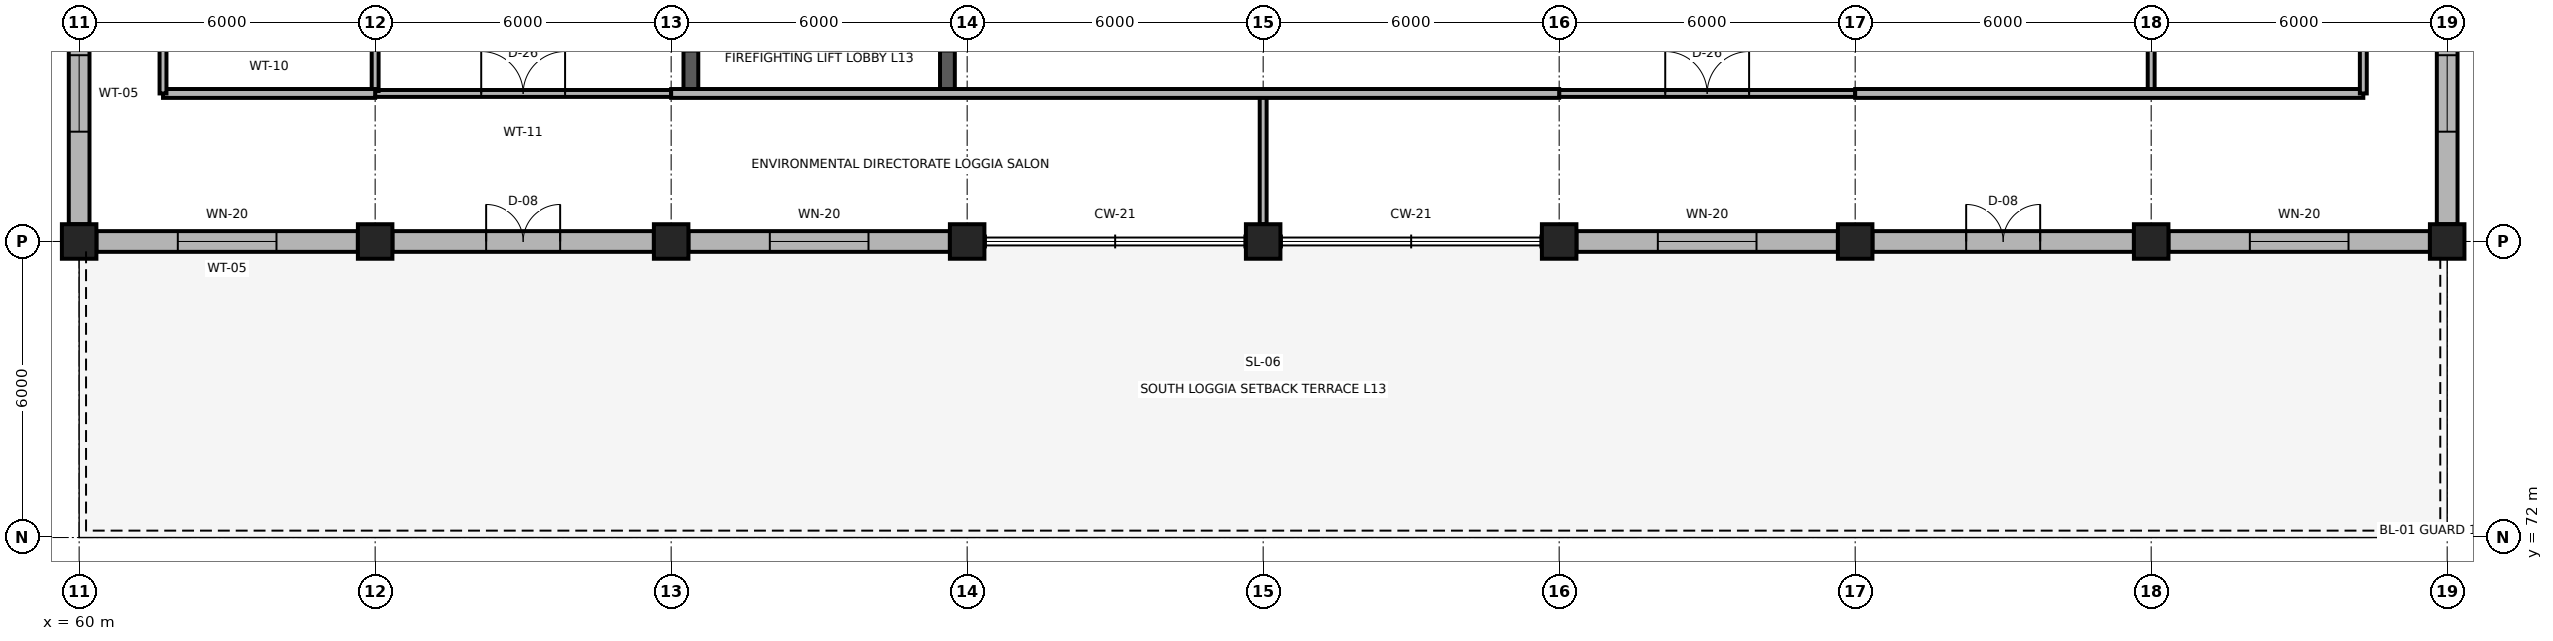
"""IFC4 building model, lengths in metres.
Left out: names, types, materials, properties, quantities, classifications, styles, units other than length and angle.
Written with IfcOpenShell. Run it as: python <this file> out.ifc"""

import sys

from ifc_helpers import new_model, si_unit, direction, frame, frame_2d, origin, origin_2d, place, context, subcontext, project, spatial, rectangle, extrude, element, fill, save


model = new_model("IFC4")
c1 = context("Model", 3, precision=1e-05, world=origin(), true_north=direction((0.0, 1.0)))
c2 = subcontext(c1, "Body", "Model", "MODEL_VIEW")
j1 = project(units=[si_unit("LENGTHUNIT", "METRE"), si_unit("PLANEANGLEUNIT", "RADIAN")], contexts=[c1])
p1 = place(None, origin())
s1 = spatial("IfcSite", under=j1, at=p1, CompositionType="ELEMENT")
p2 = place(p1, origin())
s2 = spatial("IfcBuilding", under=s1, at=p2, CompositionType="ELEMENT")
p3 = place(p2, frame((0.0, 0.0, 52.2)))
s3 = spatial("IfcBuildingStorey", under=s2, at=p3, CompositionType="ELEMENT", Elevation=52.2)
for number, where, z_axis, x_axis in (
    (1, (60.0, 78.0, 0.0), (0.0, 0.0, 1.0), (1.0, 0.0, 0.0)),
    (2, (66.0, 78.0, 0.0), (0.0, 0.0, 1.0), (1.0, 0.0, 0.0)),
    (3, (72.0, 78.0, 0.0), (0.0, 0.0, 1.0), (1.0, 0.0, 0.0)),
    (4, (78.0, 78.0, 0.0), (0.0, 0.0, 1.0), (1.0, 0.0, 0.0)),
    (5, (84.0, 78.0, 0.0), (0.0, 0.0, 1.0), (1.0, 0.0, 0.0)),
    (6, (90.0, 78.0, 0.0), (0.0, 0.0, 1.0), (1.0, 0.0, 0.0)),
    (7, (96.0, 78.0, 0.0), (0.0, 0.0, 1.0), (1.0, 0.0, 0.0)),
    (8, (102.0, 78.0, 0.0), (0.0, 0.0, 1.0), (1.0, 0.0, 0.0)),
    (9, (108.0, 78.0, 0.0), (0.0, 0.0, 1.0), (1.0, 0.0, 0.0)),
):
    element("IfcColumn", number, at=place(p3, frame(where, z_axis=z_axis, x_axis=x_axis)), inside=s3, PredefinedType="COLUMN", context=c2, shape_type="SweptSolid", body=[
        extrude(rectangle(XDim=0.7, YDim=0.7, at=origin_2d()), origin(), (0.0, 0.0, 1.0), 3.9),
    ])
p4 = place(p3, frame((60.35, 78.0, 0.0), z_axis=(0.0, 0.0, 1.0), x_axis=(1.0, 0.0, 0.0)))
e10 = element("IfcWall", 10, at=p4, inside=s3, PredefinedType="SOLIDWALL", context=c2, shape_type="SweptSolid", body=[
    extrude(rectangle(XDim=5.3, YDim=0.42, at=frame_2d((2.65, 0.0))), origin(), (0.0, 0.0, 1.0), 3.32),
])
p5 = place(p4, frame((1.65, 0.0, 0.85)))
e11 = element("IfcOpeningElement", 11, at=p5, cuts=e10, PredefinedType="OPENING", context=c2, shape_type="SweptSolid", body=[
    extrude(rectangle(XDim=2.0, YDim=1.95, at=frame_2d((1.0, 0.975))), frame((0.0, 0.225, 0.0), z_axis=(0.0, -1.0, 0.0), x_axis=(1.0, 0.0, 0.0)), (0.0, 0.0, 1.0), 0.45),
])
p6 = place(p3, frame((66.35, 78.0, 0.0), z_axis=(0.0, 0.0, 1.0), x_axis=(1.0, 0.0, 0.0)))
e12 = element("IfcWall", 12, at=p6, inside=s3, PredefinedType="SOLIDWALL", context=c2, shape_type="SweptSolid", body=[
    extrude(rectangle(XDim=5.3, YDim=0.42, at=frame_2d((2.65, 0.0))), origin(), (0.0, 0.0, 1.0), 3.32),
])
p7 = place(p6, frame((1.9, 0.0, 0.0)))
e13 = element("IfcOpeningElement", 13, at=p7, cuts=e12, PredefinedType="OPENING", context=c2, shape_type="SweptSolid", body=[
    extrude(rectangle(XDim=1.5, YDim=2.3, at=frame_2d((0.75, 1.15))), frame((0.0, 0.225, 0.0), z_axis=(0.0, -1.0, 0.0), x_axis=(1.0, 0.0, 0.0)), (0.0, 0.0, 1.0), 0.45),
])
p8 = place(p3, frame((72.35, 78.0, 0.0), z_axis=(0.0, 0.0, 1.0), x_axis=(1.0, 0.0, 0.0)))
e14 = element("IfcWall", 14, at=p8, inside=s3, PredefinedType="SOLIDWALL", context=c2, shape_type="SweptSolid", body=[
    extrude(rectangle(XDim=5.3, YDim=0.42, at=frame_2d((2.65, 0.0))), origin(), (0.0, 0.0, 1.0), 3.32),
])
p9 = place(p8, frame((1.65, 0.0, 0.85)))
e15 = element("IfcOpeningElement", 15, at=p9, cuts=e14, PredefinedType="OPENING", context=c2, shape_type="SweptSolid", body=[
    extrude(rectangle(XDim=2.0, YDim=1.95, at=frame_2d((1.0, 0.975))), frame((0.0, 0.225, 0.0), z_axis=(0.0, -1.0, 0.0), x_axis=(1.0, 0.0, 0.0)), (0.0, 0.0, 1.0), 0.45),
])
p10 = place(p3, frame((90.35, 78.0, 0.0), z_axis=(0.0, 0.0, 1.0), x_axis=(1.0, 0.0, 0.0)))
e16 = element("IfcWall", 16, at=p10, inside=s3, PredefinedType="SOLIDWALL", context=c2, shape_type="SweptSolid", body=[
    extrude(rectangle(XDim=5.3, YDim=0.42, at=frame_2d((2.65, 0.0))), origin(), (0.0, 0.0, 1.0), 3.32),
])
p11 = place(p10, frame((1.65, 0.0, 0.85)))
e17 = element("IfcOpeningElement", 17, at=p11, cuts=e16, PredefinedType="OPENING", context=c2, shape_type="SweptSolid", body=[
    extrude(rectangle(XDim=2.0, YDim=1.95, at=frame_2d((1.0, 0.975))), frame((0.0, 0.225, 0.0), z_axis=(0.0, -1.0, 0.0), x_axis=(1.0, 0.0, 0.0)), (0.0, 0.0, 1.0), 0.45),
])
p12 = place(p3, frame((96.35, 78.0, 0.0), z_axis=(0.0, 0.0, 1.0), x_axis=(1.0, 0.0, 0.0)))
e18 = element("IfcWall", 18, at=p12, inside=s3, PredefinedType="SOLIDWALL", context=c2, shape_type="SweptSolid", body=[
    extrude(rectangle(XDim=5.3, YDim=0.42, at=frame_2d((2.65, 0.0))), origin(), (0.0, 0.0, 1.0), 3.32),
])
p13 = place(p12, frame((1.9, 0.0, 0.0)))
e19 = element("IfcOpeningElement", 19, at=p13, cuts=e18, PredefinedType="OPENING", context=c2, shape_type="SweptSolid", body=[
    extrude(rectangle(XDim=1.5, YDim=2.3, at=frame_2d((0.75, 1.15))), frame((0.0, 0.225, 0.0), z_axis=(0.0, -1.0, 0.0), x_axis=(1.0, 0.0, 0.0)), (0.0, 0.0, 1.0), 0.45),
])
p14 = place(p3, frame((102.35, 78.0, 0.0), z_axis=(0.0, 0.0, 1.0), x_axis=(1.0, 0.0, 0.0)))
e20 = element("IfcWall", 20, at=p14, inside=s3, PredefinedType="SOLIDWALL", context=c2, shape_type="SweptSolid", body=[
    extrude(rectangle(XDim=5.3, YDim=0.42, at=frame_2d((2.65, 0.0))), origin(), (0.0, 0.0, 1.0), 3.32),
])
p15 = place(p14, frame((1.65, 0.0, 0.85)))
e21 = element("IfcOpeningElement", 21, at=p15, cuts=e20, PredefinedType="OPENING", context=c2, shape_type="SweptSolid", body=[
    extrude(rectangle(XDim=2.0, YDim=1.95, at=frame_2d((1.0, 0.975))), frame((0.0, 0.225, 0.0), z_axis=(0.0, -1.0, 0.0), x_axis=(1.0, 0.0, 0.0)), (0.0, 0.0, 1.0), 0.45),
])
p16 = place(p3, frame((60.0, 78.35, 0.0), z_axis=(0.0, 0.0, 1.0), x_axis=(0.0, 1.0, 0.0)))
e22 = element("IfcWall", 22, at=p16, inside=s3, PredefinedType="SOLIDWALL", context=c2, shape_type="SweptSolid", body=[
    extrude(rectangle(XDim=5.3, YDim=0.42, at=frame_2d((2.65, 0.0))), origin(), (0.0, 0.0, 1.0), 3.32),
])
p17 = place(p16, frame((1.875, 0.0, 0.85)))
e23 = element("IfcOpeningElement", 23, at=p17, cuts=e22, PredefinedType="OPENING", context=c2, shape_type="SweptSolid", body=[
    extrude(rectangle(XDim=1.55, YDim=1.9, at=frame_2d((0.775, 0.95))), frame((0.0, 0.225, 0.0), z_axis=(0.0, -1.0, 0.0), x_axis=(1.0, 0.0, 0.0)), (0.0, 0.0, 1.0), 0.45),
])
p18 = place(p3, frame((108.0, 78.35, 0.0), z_axis=(0.0, 0.0, 1.0), x_axis=(0.0, 1.0, 0.0)))
e24 = element("IfcWall", 24, at=p18, inside=s3, PredefinedType="SOLIDWALL", context=c2, shape_type="SweptSolid", body=[
    extrude(rectangle(XDim=5.3, YDim=0.42, at=frame_2d((2.65, 0.0))), origin(), (0.0, 0.0, 1.0), 3.32),
])
p19 = place(p18, frame((1.875, 0.0, 0.85)))
e25 = element("IfcOpeningElement", 25, at=p19, cuts=e24, PredefinedType="OPENING", context=c2, shape_type="SweptSolid", body=[
    extrude(rectangle(XDim=1.55, YDim=1.9, at=frame_2d((0.775, 0.95))), frame((0.0, 0.225, 0.0), z_axis=(0.0, -1.0, 0.0), x_axis=(1.0, 0.0, 0.0)), (0.0, 0.0, 1.0), 0.45),
])
p20 = place(p3, frame((72.4, 81.0, 0.0), z_axis=(0.0, 0.0, 1.0), x_axis=(0.0, 1.0, 0.0)))
e26 = element("IfcWall", 26, at=p20, inside=s3, PredefinedType="SHEAR", context=c2, shape_type="SweptSolid", body=[
    extrude(rectangle(XDim=3.0, YDim=0.3, at=frame_2d((1.5, 0.0))), origin(), (0.0, 0.0, 1.0), 3.74),
])
p21 = place(p20, frame((0.85, 0.0, 0.0)))
e27 = element("IfcOpeningElement", 27, at=p21, cuts=e26, PredefinedType="OPENING", context=c2, shape_type="SweptSolid", body=[
    extrude(rectangle(XDim=1.3, YDim=2.2, at=frame_2d((0.65, 1.1))), frame((0.0, 0.165, 0.0), z_axis=(0.0, -1.0, 0.0), x_axis=(1.0, 0.0, 0.0)), (0.0, 0.0, 1.0), 0.33),
])
p22 = place(p3, frame((77.6, 81.0, 0.0), z_axis=(0.0, 0.0, 1.0), x_axis=(0.0, 1.0, 0.0)))
e28 = element("IfcWall", 28, at=p22, inside=s3, PredefinedType="SHEAR", context=c2, shape_type="SweptSolid", body=[
    extrude(rectangle(XDim=3.0, YDim=0.3, at=frame_2d((1.5, 0.0))), origin(), (0.0, 0.0, 1.0), 3.74),
])
p23 = place(p22, frame((0.85, 0.0, 0.0)))
e29 = element("IfcOpeningElement", 29, at=p23, cuts=e28, PredefinedType="OPENING", context=c2, shape_type="SweptSolid", body=[
    extrude(rectangle(XDim=1.3, YDim=2.2, at=frame_2d((0.65, 1.1))), frame((0.0, 0.165, 0.0), z_axis=(0.0, -1.0, 0.0), x_axis=(1.0, 0.0, 0.0)), (0.0, 0.0, 1.0), 0.33),
])
p24 = place(p3, frame((66.0, 81.0, 0.0), z_axis=(0.0, 0.0, 1.0), x_axis=(1.0, 0.0, 0.0)))
e30 = element("IfcWall", 30, at=p24, inside=s3, PredefinedType="PARTITIONING", context=c2, shape_type="SweptSolid", body=[
    extrude(rectangle(XDim=6.0, YDim=0.14, at=frame_2d((3.0, 0.0))), origin(), (0.0, 0.0, 1.0), 3.74),
])
p25 = place(p24, frame((2.15, 0.0, 0.0)))
e31 = element("IfcOpeningElement", 31, at=p25, cuts=e30, PredefinedType="OPENING", context=c2, shape_type="SweptSolid", body=[
    extrude(rectangle(XDim=1.7, YDim=2.45, at=frame_2d((0.85, 1.225))), frame((0.0, 0.085, 0.0), z_axis=(0.0, -1.0, 0.0), x_axis=(1.0, 0.0, 0.0)), (0.0, 0.0, 1.0), 0.17),
])
p26 = place(p3, frame((90.0, 81.0, 0.0), z_axis=(0.0, 0.0, 1.0), x_axis=(1.0, 0.0, 0.0)))
e32 = element("IfcWall", 32, at=p26, inside=s3, PredefinedType="PARTITIONING", context=c2, shape_type="SweptSolid", body=[
    extrude(rectangle(XDim=6.0, YDim=0.14, at=frame_2d((3.0, 0.0))), origin(), (0.0, 0.0, 1.0), 3.74),
])
p27 = place(p26, frame((2.15, 0.0, 0.0)))
e33 = element("IfcOpeningElement", 33, at=p27, cuts=e32, PredefinedType="OPENING", context=c2, shape_type="SweptSolid", body=[
    extrude(rectangle(XDim=1.7, YDim=2.45, at=frame_2d((0.85, 1.225))), frame((0.0, 0.085, 0.0), z_axis=(0.0, -1.0, 0.0), x_axis=(1.0, 0.0, 0.0)), (0.0, 0.0, 1.0), 0.17),
])
p28 = place(p3, frame((66.0, 81.05, 0.0), z_axis=(0.0, 0.0, 1.0), x_axis=(0.0, 1.0, 0.0)))
e34 = element("IfcWall", 34, at=p28, inside=s3, PredefinedType="PARTITIONING", context=c2, shape_type="SweptSolid", body=[
    extrude(rectangle(XDim=2.9, YDim=0.14, at=frame_2d((1.45, 0.0))), origin(), (0.0, 0.0, 1.0), 3.449),
])
p29 = place(p28, frame((0.925, 0.0, 0.0)))
e35 = element("IfcOpeningElement", 35, at=p29, cuts=e34, PredefinedType="OPENING", context=c2, shape_type="SweptSolid", body=[
    extrude(rectangle(XDim=1.05, YDim=2.25, at=frame_2d((0.525, 1.125))), frame((0.0, 0.085, 0.0), z_axis=(0.0, -1.0, 0.0), x_axis=(1.0, 0.0, 0.0)), (0.0, 0.0, 1.0), 0.17),
])
p30 = place(p3, frame((102.0, 81.05, 0.0), z_axis=(0.0, 0.0, 1.0), x_axis=(0.0, 1.0, 0.0)))
e36 = element("IfcWall", 36, at=p30, inside=s3, PredefinedType="PARTITIONING", context=c2, shape_type="SweptSolid", body=[
    extrude(rectangle(XDim=2.9, YDim=0.14, at=frame_2d((1.45, 0.0))), origin(), (0.0, 0.0, 1.0), 3.449),
])
p31 = place(p30, frame((0.925, 0.0, 0.0)))
e37 = element("IfcOpeningElement", 37, at=p31, cuts=e36, PredefinedType="OPENING", context=c2, shape_type="SweptSolid", body=[
    extrude(rectangle(XDim=1.05, YDim=2.25, at=frame_2d((0.525, 1.125))), frame((0.0, 0.085, 0.0), z_axis=(0.0, -1.0, 0.0), x_axis=(1.0, 0.0, 0.0)), (0.0, 0.0, 1.0), 0.17),
])
p32 = place(p3, frame((84.0, 78.35, 0.0), z_axis=(0.0, 0.0, 1.0), x_axis=(0.0, 1.0, 0.0)))
e38 = element("IfcWall", 38, at=p32, inside=s3, PredefinedType="PARTITIONING", context=c2, shape_type="SweptSolid", body=[
    extrude(rectangle(XDim=2.65, YDim=0.14, at=frame_2d((1.325, 0.0))), origin(), (0.0, 0.0, 1.0), 3.449),
])
p33 = place(p3, frame((61.7, 81.0, 0.0), z_axis=(0.0, 0.0, 1.0), x_axis=(1.0, 0.0, 0.0)))
e39 = element("IfcWall", 39, at=p33, inside=s3, PredefinedType="PARTITIONING", context=c2, shape_type="SweptSolid", body=[
    extrude(rectangle(XDim=4.3, YDim=0.18, at=frame_2d((2.15, 0.0))), origin(), (0.0, 0.0, 1.0), 3.74),
])
p34 = place(p3, frame((72.0, 81.0, 0.0), z_axis=(0.0, 0.0, 1.0), x_axis=(1.0, 0.0, 0.0)))
e40 = element("IfcWall", 40, at=p34, inside=s3, PredefinedType="PARTITIONING", context=c2, shape_type="SweptSolid", body=[
    extrude(rectangle(XDim=18.0, YDim=0.18, at=frame_2d((9.0, 0.0))), origin(), (0.0, 0.0, 1.0), 3.74),
])
p35 = place(p3, frame((96.0, 81.0, 0.0), z_axis=(0.0, 0.0, 1.0), x_axis=(1.0, 0.0, 0.0)))
e41 = element("IfcWall", 41, at=p35, inside=s3, PredefinedType="PARTITIONING", context=c2, shape_type="SweptSolid", body=[
    extrude(rectangle(XDim=10.3, YDim=0.18, at=frame_2d((5.15, 0.0))), origin(), (0.0, 0.0, 1.0), 3.74),
])
for number, where, z_axis, x_axis in (
    (42, (61.7, 81.0, 0.0), (0.0, 0.0, 1.0), (0.0, 1.0, 0.0)),
    (43, (106.3, 81.0, 0.0), (0.0, 0.0, 1.0), (0.0, 1.0, 0.0)),
):
    element("IfcWall", number, at=place(p3, frame(where, z_axis=z_axis, x_axis=x_axis)), inside=s3, PredefinedType="PARTITIONING", context=c2, shape_type="SweptSolid", body=[
        extrude(rectangle(XDim=1.15, YDim=0.14, at=frame_2d((0.575, 0.0))), origin(), (0.0, 0.0, 1.0), 3.74),
    ])
p36 = place(p5, origin())
e44 = element("IfcWindow", 44, at=p36, inside=s3, PartitioningType="SINGLE_PANEL", PredefinedType="WINDOW", context=c2, shape_type="SweptSolid", body=[
    extrude(rectangle(XDim=2.0, YDim=1.95, at=frame_2d((1.0, 0.975))), frame((0.0, 0.03, 0.0), z_axis=(0.0, -1.0, 0.0), x_axis=(1.0, 0.0, 0.0)), (0.0, 0.0, 1.0), 0.06),
])
fill(e11, e44)
p37 = place(p7, origin())
e45 = element("IfcDoor", 45, at=p37, inside=s3, OperationType="DOUBLE_DOOR_SINGLE_SWING", PredefinedType="DOOR", context=c2, shape_type="SweptSolid", body=[
    extrude(rectangle(XDim=1.5, YDim=2.3, at=frame_2d((0.75, 1.15))), frame((0.0, 0.025, 0.0), z_axis=(0.0, -1.0, 0.0), x_axis=(1.0, 0.0, 0.0)), (0.0, 0.0, 1.0), 0.05),
])
fill(e13, e45)
p38 = place(p9, origin())
e46 = element("IfcWindow", 46, at=p38, inside=s3, PartitioningType="SINGLE_PANEL", PredefinedType="WINDOW", context=c2, shape_type="SweptSolid", body=[
    extrude(rectangle(XDim=2.0, YDim=1.95, at=frame_2d((1.0, 0.975))), frame((0.0, 0.03, 0.0), z_axis=(0.0, -1.0, 0.0), x_axis=(1.0, 0.0, 0.0)), (0.0, 0.0, 1.0), 0.06),
])
fill(e15, e46)
p39 = place(p11, origin())
e47 = element("IfcWindow", 47, at=p39, inside=s3, PartitioningType="SINGLE_PANEL", PredefinedType="WINDOW", context=c2, shape_type="SweptSolid", body=[
    extrude(rectangle(XDim=2.0, YDim=1.95, at=frame_2d((1.0, 0.975))), frame((0.0, 0.03, 0.0), z_axis=(0.0, -1.0, 0.0), x_axis=(1.0, 0.0, 0.0)), (0.0, 0.0, 1.0), 0.06),
])
fill(e17, e47)
p40 = place(p13, origin())
e48 = element("IfcDoor", 48, at=p40, inside=s3, OperationType="DOUBLE_DOOR_SINGLE_SWING", PredefinedType="DOOR", context=c2, shape_type="SweptSolid", body=[
    extrude(rectangle(XDim=1.5, YDim=2.3, at=frame_2d((0.75, 1.15))), frame((0.0, 0.025, 0.0), z_axis=(0.0, -1.0, 0.0), x_axis=(1.0, 0.0, 0.0)), (0.0, 0.0, 1.0), 0.05),
])
fill(e19, e48)
p41 = place(p15, origin())
e49 = element("IfcWindow", 49, at=p41, inside=s3, PartitioningType="SINGLE_PANEL", PredefinedType="WINDOW", context=c2, shape_type="SweptSolid", body=[
    extrude(rectangle(XDim=2.0, YDim=1.95, at=frame_2d((1.0, 0.975))), frame((0.0, 0.03, 0.0), z_axis=(0.0, -1.0, 0.0), x_axis=(1.0, 0.0, 0.0)), (0.0, 0.0, 1.0), 0.06),
])
fill(e21, e49)
p42 = place(p17, origin())
e50 = element("IfcWindow", 50, at=p42, inside=s3, PartitioningType="SINGLE_PANEL", PredefinedType="WINDOW", context=c2, shape_type="SweptSolid", body=[
    extrude(rectangle(XDim=1.55, YDim=1.9, at=frame_2d((0.775, 0.95))), frame((0.0, 0.03, 0.0), z_axis=(0.0, -1.0, 0.0), x_axis=(1.0, 0.0, 0.0)), (0.0, 0.0, 1.0), 0.06),
])
fill(e23, e50)
p43 = place(p19, origin())
e51 = element("IfcWindow", 51, at=p43, inside=s3, PartitioningType="SINGLE_PANEL", PredefinedType="WINDOW", context=c2, shape_type="SweptSolid", body=[
    extrude(rectangle(XDim=1.55, YDim=1.9, at=frame_2d((0.775, 0.95))), frame((0.0, 0.03, 0.0), z_axis=(0.0, -1.0, 0.0), x_axis=(1.0, 0.0, 0.0)), (0.0, 0.0, 1.0), 0.06),
])
fill(e25, e51)
p44 = place(p25, origin())
e52 = element("IfcDoor", 52, at=p44, inside=s3, OperationType="DOUBLE_DOOR_SINGLE_SWING", PredefinedType="DOOR", context=c2, shape_type="SweptSolid", body=[
    extrude(rectangle(XDim=1.7, YDim=2.45, at=frame_2d((0.85, 1.225))), frame((0.0, 0.025, 0.0), z_axis=(0.0, -1.0, 0.0), x_axis=(1.0, 0.0, 0.0)), (0.0, 0.0, 1.0), 0.05),
])
fill(e31, e52)
p45 = place(p27, origin())
e53 = element("IfcDoor", 53, at=p45, inside=s3, OperationType="DOUBLE_DOOR_SINGLE_SWING", PredefinedType="DOOR", context=c2, shape_type="SweptSolid", body=[
    extrude(rectangle(XDim=1.7, YDim=2.45, at=frame_2d((0.85, 1.225))), frame((0.0, 0.025, 0.0), z_axis=(0.0, -1.0, 0.0), x_axis=(1.0, 0.0, 0.0)), (0.0, 0.0, 1.0), 0.05),
])
fill(e33, e53)
save(model, sys.argv[1])
